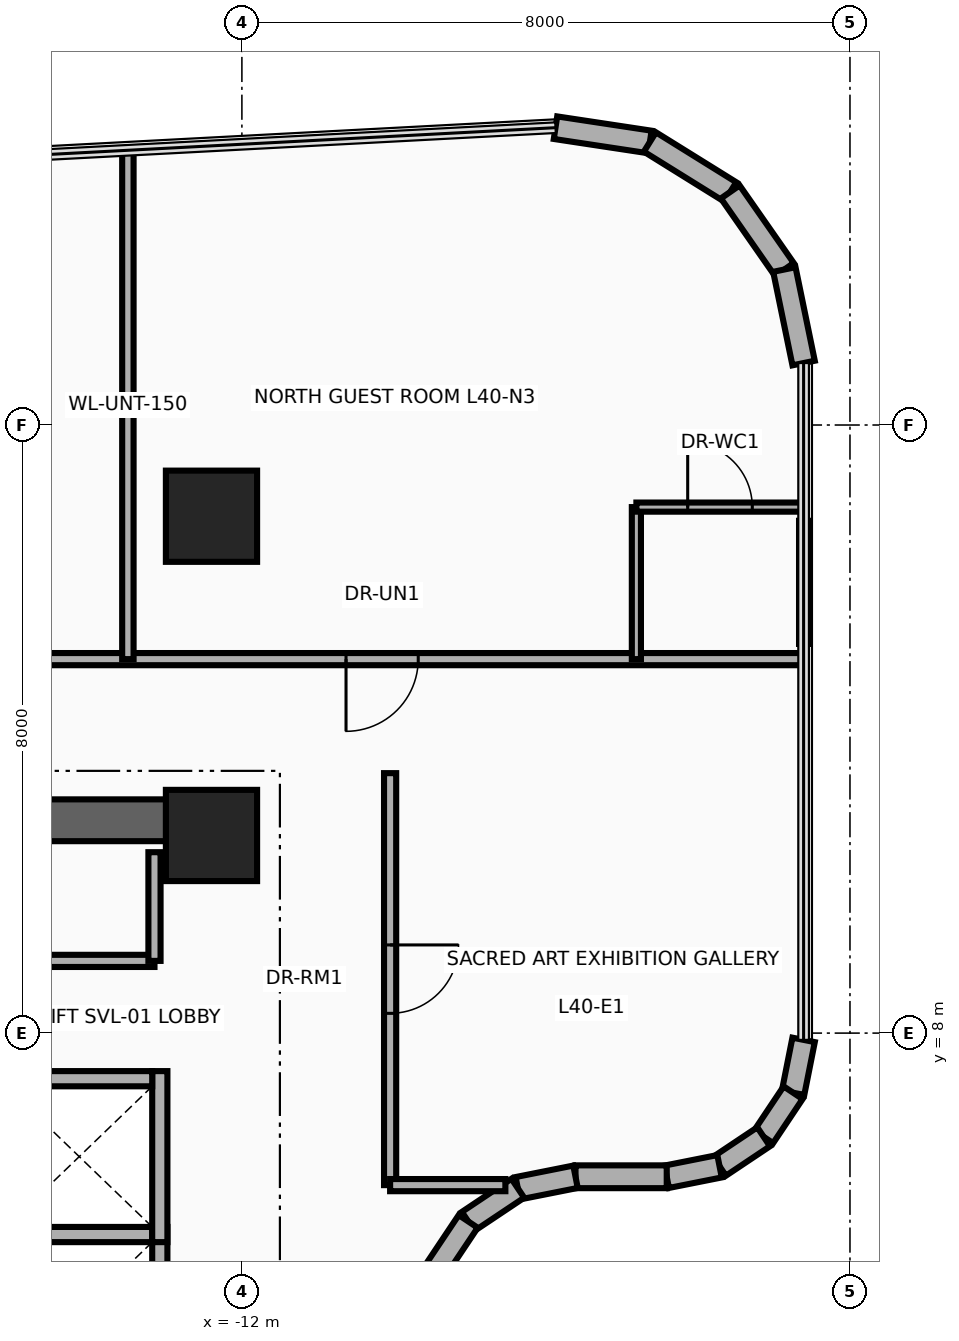
"""IFC4 building model, lengths in metres.
Left out: names, types, materials, properties, quantities, classifications, styles, units other than length and angle.
Written with IfcOpenShell. Run it as: python <this file> out.ifc"""

import sys

from ifc_helpers import new_model, si_unit, direction, frame, frame_2d, origin, origin_2d, place, context, subcontext, project, spatial, rectangle, extrude, source, transform, mapped, element, fill, save


model = new_model("IFC4")
c1 = context("Model", 3, precision=1e-05, world=origin(), true_north=direction((0.0, 1.0)))
c2 = subcontext(c1, "Body", "Model", "MODEL_VIEW")
j1 = project(units=[si_unit("LENGTHUNIT", "METRE"), si_unit("PLANEANGLEUNIT", "RADIAN")], contexts=[c1])
p1 = place(None, origin())
s1 = spatial("IfcSite", under=j1, at=p1, CompositionType="ELEMENT")
p2 = place(p1, origin())
s2 = spatial("IfcBuilding", under=s1, at=p2, CompositionType="ELEMENT")
p3 = place(p2, frame((0.0, 0.0, 157.5)))
s3 = spatial("IfcBuildingStorey", under=s2, at=p3, CompositionType="ELEMENT", Elevation=157.5)
p4 = place(p3, frame((-22.65, 10.8, 0.0), z_axis=(0.0, 0.0, 1.0), x_axis=(1.0, 0.0, 0.0)))
e1 = element("IfcWall", 1, at=p4, inside=s3, PredefinedType="SHEAR", context=c2, shape_type="SweptSolid", body=[
    extrude(rectangle(XDim=10.25, YDim=0.55, at=frame_2d((5.125, 0.0))), origin(), (0.0, 0.0, 1.0), 3.46),
])
m1 = source(origin(), c2, "Body", "SweptSolid", [
    extrude(rectangle(XDim=1.2, YDim=1.2, at=origin_2d()), origin(), (0.0, 0.0, 1.0), 3.7),
])
for number, where, z_axis, x_axis in (
    (2, (-12.4, 10.6, 0.0), (0.0, 0.0, 1.0), (1.0, 0.0, 0.0)),
    (3, (-12.4, 14.8, 0.0), (0.0, 0.0, 1.0), (1.0, 0.0, 0.0)),
):
    element("IfcColumn", number, at=place(p3, frame(where, z_axis=z_axis, x_axis=x_axis)), inside=s3, PredefinedType="COLUMN", context=c2, shape_type="MappedRepresentation", body=[
        mapped(m1, transform((0.0, 0.0, 0.0), x_axis=(1.0, 0.0, 0.0), y_axis=(0.0, 1.0, 0.0), z_axis=(0.0, 0.0, 1.0), scale=1.0)),
    ])
p5 = place(p3, frame((-7.874, 19.912, 0.0), z_axis=(0.0, 0.0, 1.0), x_axis=(0.988741655411, -0.149632679769, 0.0)))
e4 = element("IfcWall", 4, at=p5, inside=s3, PredefinedType="SOLIDWALL", context=c2, shape_type="SweptSolid", body=[
    extrude(rectangle(XDim=1.256, YDim=0.3, at=frame_2d((0.628, 0.0))), origin(), (0.0, 0.0, 1.0), 3.46),
])
p6 = place(p3, frame((-6.632, 19.724, 0.0), z_axis=(0.0, 0.0, 1.0), x_axis=(0.849285325289, -0.527934121126, 0.0)))
e5 = element("IfcWall", 5, at=p6, inside=s3, PredefinedType="SOLIDWALL", context=c2, shape_type="SweptSolid", body=[
    extrude(rectangle(XDim=1.244, YDim=0.3, at=frame_2d((0.622, 0.0))), origin(), (0.0, 0.0, 1.0), 3.46),
])
p7 = place(p3, frame((-5.575, 19.067, 0.0), z_axis=(0.0, 0.0, 1.0), x_axis=(0.571960670617, -0.820281044074, 0.0)))
e6 = element("IfcWall", 6, at=p7, inside=s3, PredefinedType="SOLIDWALL", context=c2, shape_type="SweptSolid", body=[
    extrude(rectangle(XDim=1.245, YDim=0.3, at=frame_2d((0.622, 0.0))), origin(), (0.0, 0.0, 1.0), 3.46),
])
p8 = place(p3, frame((-4.863, 18.046, 0.0), z_axis=(0.0, 0.0, 1.0), x_axis=(0.201532282172, -0.97948187285, 0.0)))
e7 = element("IfcWall", 7, at=p8, inside=s3, PredefinedType="SOLIDWALL", context=c2, shape_type="SweptSolid", body=[
    extrude(rectangle(XDim=1.256, YDim=0.3, at=frame_2d((0.628, 0.0))), origin(), (0.0, 0.0, 1.0), 3.46),
])
p9 = place(p3, frame((-4.61, 7.911, 0.0), z_axis=(0.0, 0.0, 1.0), x_axis=(-0.194989739953, -0.980805282058, 0.0)))
e8 = element("IfcWall", 8, at=p9, inside=s3, PredefinedType="SOLIDWALL", context=c2, shape_type="SweptSolid", body=[
    extrude(rectangle(XDim=0.709, YDim=0.3, at=frame_2d((0.354, 0.0))), origin(), (0.0, 0.0, 1.0), 3.46),
])
for number, where, z_axis, x_axis in (
    (9, (-4.748, 7.216, 0.0), (0.0, 0.0, 1.0), (-0.555, -0.832, 0.0)),
    (10, (-5.136, 6.636, 0.0), (0.0, 0.0, 1.0), (-0.832, -0.555, 0.0)),
):
    element("IfcWall", number, at=place(p3, frame(where, z_axis=z_axis, x_axis=x_axis)), inside=s3, PredefinedType="SOLIDWALL", context=c2, shape_type="SweptSolid", body=[
        extrude(rectangle(XDim=0.698, YDim=0.3, at=frame_2d((0.349, 0.0))), origin(), (0.0, 0.0, 1.0), 3.46),
    ])
p10 = place(p3, frame((-5.716, 6.248, 0.0), z_axis=(0.0, 0.0, 1.0), x_axis=(-0.980805282058, -0.194989739953, 0.0)))
e11 = element("IfcWall", 11, at=p10, inside=s3, PredefinedType="SOLIDWALL", context=c2, shape_type="SweptSolid", body=[
    extrude(rectangle(XDim=0.709, YDim=0.3, at=frame_2d((0.354, 0.0))), origin(), (0.0, 0.0, 1.0), 3.46),
])
p11 = place(p3, frame((-6.411, 6.11, 0.0), z_axis=(0.0, 0.0, 1.0), x_axis=(-1.0, 0.0, 0.0)))
e12 = element("IfcWall", 12, at=p11, inside=s3, PredefinedType="SOLIDWALL", context=c2, shape_type="SweptSolid", body=[
    extrude(rectangle(XDim=1.2, YDim=0.3, at=frame_2d((0.6, 0.0))), origin(), (0.0, 0.0, 1.0), 3.46),
])
p12 = place(p3, frame((-7.611, 6.11, 0.0), z_axis=(0.0, 0.0, 1.0), x_axis=(-0.98076219082, -0.195206365311, 0.0)))
e13 = element("IfcWall", 13, at=p12, inside=s3, PredefinedType="SOLIDWALL", context=c2, shape_type="SweptSolid", body=[
    extrude(rectangle(XDim=0.774, YDim=0.3, at=frame_2d((0.387, 0.0))), origin(), (0.0, 0.0, 1.0), 3.46),
])
for number, where, z_axis, x_axis in (
    (14, (-8.37, 5.959, 0.0), (0.0, 0.0, 1.0), (-0.831, -0.556, 0.0)),
    (15, (-9.023, 5.523, 0.0), (0.0, 0.0, 1.0), (-0.556, -0.831, 0.0)),
):
    element("IfcWall", number, at=place(p3, frame(where, z_axis=z_axis, x_axis=x_axis)), inside=s3, PredefinedType="SOLIDWALL", context=c2, shape_type="SweptSolid", body=[
        extrude(rectangle(XDim=0.785, YDim=0.3, at=frame_2d((0.393, 0.0))), origin(), (0.0, 0.0, 1.0), 3.46),
    ])
p13 = place(p3, frame((-13.08, 3.2, 0.0), z_axis=(0.0, 0.0, 1.0), x_axis=(0.0, 1.0, 0.0)))
e16 = element("IfcWall", 16, at=p13, inside=s3, PredefinedType="MOVABLE", context=c2, shape_type="SweptSolid", body=[
    extrude(rectangle(XDim=2.25, YDim=0.2, at=frame_2d((1.125, 0.0))), origin(), (0.0, 0.0, 1.0), 3.46),
])
p14 = place(p3, frame((-15.1, 5.35, 0.0), z_axis=(0.0, 0.0, 1.0), x_axis=(1.0, 0.0, 0.0)))
e17 = element("IfcWall", 17, at=p14, inside=s3, PredefinedType="MOVABLE", context=c2, shape_type="SweptSolid", body=[
    extrude(rectangle(XDim=1.92, YDim=0.2, at=frame_2d((0.96, 0.0))), origin(), (0.0, 0.0, 1.0), 3.46),
])
p15 = place(p3, frame((-13.08, 5.25, 0.0), z_axis=(0.0, 0.0, 1.0), x_axis=(0.0, 1.0, 0.0)))
e18 = element("IfcWall", 18, at=p15, inside=s3, PredefinedType="MOVABLE", context=c2, shape_type="SweptSolid", body=[
    extrude(rectangle(XDim=2.25, YDim=0.2, at=frame_2d((1.125, 0.0))), origin(), (0.0, 0.0, 1.0), 3.46),
])
p16 = place(p3, frame((-15.1, 7.4, 0.0), z_axis=(0.0, 0.0, 1.0), x_axis=(1.0, 0.0, 0.0)))
e19 = element("IfcWall", 19, at=p16, inside=s3, PredefinedType="MOVABLE", context=c2, shape_type="SweptSolid", body=[
    extrude(rectangle(XDim=1.92, YDim=0.2, at=frame_2d((0.96, 0.0))), origin(), (0.0, 0.0, 1.0), 3.46),
])
p17 = place(p3, frame((-18.65, 8.95, 0.0), z_axis=(0.0, 0.0, 1.0), x_axis=(1.0, 0.0, 0.0)))
e20 = element("IfcWall", 20, at=p17, inside=s3, PredefinedType="PARTITIONING", context=c2, shape_type="SweptSolid", body=[
    extrude(rectangle(XDim=5.5, YDim=0.16, at=frame_2d((2.75, 0.0))), origin(), (0.0, 0.0, 1.0), 3.46),
])
p18 = place(p17, frame((0.3, 0.0, 0.0)))
e21 = element("IfcOpeningElement", 21, at=p18, cuts=e20, PredefinedType="OPENING", context=c2, shape_type="SweptSolid", body=[
    extrude(rectangle(XDim=0.85, YDim=2.05, at=frame_2d((0.425, 1.025))), frame((0.0, 0.095, 0.0), z_axis=(0.0, -1.0, 0.0), x_axis=(1.0, 0.0, 0.0)), (0.0, 0.0, 1.0), 0.19),
])
p19 = place(p17, frame((2.5, 0.0, 0.0)))
e22 = element("IfcOpeningElement", 22, at=p19, cuts=e20, PredefinedType="OPENING", context=c2, shape_type="SweptSolid", body=[
    extrude(rectangle(XDim=0.95, YDim=2.15, at=frame_2d((0.475, 1.075))), frame((0.0, 0.095, 0.0), z_axis=(0.0, -1.0, 0.0), x_axis=(1.0, 0.0, 0.0)), (0.0, 0.0, 1.0), 0.19),
])
p20 = place(p3, frame((-13.15, 8.95, 0.0), z_axis=(0.0, 0.0, 1.0), x_axis=(0.0, 1.0, 0.0)))
e23 = element("IfcWall", 23, at=p20, inside=s3, PredefinedType="PARTITIONING", context=c2, shape_type="SweptSolid", body=[
    extrude(rectangle(XDim=1.43, YDim=0.16, at=frame_2d((0.715, 0.0))), origin(), (0.0, 0.0, 1.0), 3.46),
])
p21 = place(p3, frame((-28.25, 12.92, 0.0), z_axis=(0.0, 0.0, 1.0), x_axis=(1.0, 0.0, 0.0)))
e24 = element("IfcWall", 24, at=p21, inside=s3, PredefinedType="PARTITIONING", context=c2, shape_type="SweptSolid", body=[
    extrude(rectangle(XDim=23.64, YDim=0.16, at=frame_2d((11.82, 0.0))), origin(), (0.0, 0.0, 1.0), 2.834),
])
p22 = place(p21, frame((2.75, 0.0, 0.0)))
e25 = element("IfcOpeningElement", 25, at=p22, cuts=e24, PredefinedType="OPENING", context=c2, shape_type="SweptSolid", body=[
    extrude(rectangle(XDim=0.95, YDim=2.15, at=frame_2d((0.475, 1.075))), frame((0.0, 0.095, 0.0), z_axis=(0.0, -1.0, 0.0), x_axis=(1.0, 0.0, 0.0)), (0.0, 0.0, 1.0), 0.19),
])
p23 = place(p21, frame((10.125, 0.0, 0.0)))
e26 = element("IfcOpeningElement", 26, at=p23, cuts=e24, PredefinedType="OPENING", context=c2, shape_type="SweptSolid", body=[
    extrude(rectangle(XDim=0.95, YDim=2.15, at=frame_2d((0.475, 1.075))), frame((0.0, 0.095, 0.0), z_axis=(0.0, -1.0, 0.0), x_axis=(1.0, 0.0, 0.0)), (0.0, 0.0, 1.0), 0.19),
])
p24 = place(p21, frame((17.62, 0.0, 0.0)))
e27 = element("IfcOpeningElement", 27, at=p24, cuts=e24, PredefinedType="OPENING", context=c2, shape_type="SweptSolid", body=[
    extrude(rectangle(XDim=0.95, YDim=2.15, at=frame_2d((0.475, 1.075))), frame((0.0, 0.095, 0.0), z_axis=(0.0, -1.0, 0.0), x_axis=(1.0, 0.0, 0.0)), (0.0, 0.0, 1.0), 0.19),
])
p25 = place(p3, frame((-13.5, 12.92, 0.0), z_axis=(0.0, 0.0, 1.0), x_axis=(0.0, 1.0, 0.0)))
e28 = element("IfcWall", 28, at=p25, inside=s3, PredefinedType="PARTITIONING", context=c2, shape_type="SweptSolid", body=[
    extrude(rectangle(XDim=6.694, YDim=0.15, at=frame_2d((3.347, 0.0))), origin(), (0.0, 0.0, 1.0), 2.666),
])
p26 = place(p3, frame((-6.81, 12.92, 0.0), z_axis=(0.0, 0.0, 1.0), x_axis=(0.0, 1.0, 0.0)))
e29 = element("IfcWall", 29, at=p26, inside=s3, PredefinedType="PARTITIONING", context=c2, shape_type="SweptSolid", body=[
    extrude(rectangle(XDim=2.0, YDim=0.12, at=frame_2d((1.0, 0.0))), origin(), (0.0, 0.0, 1.0), 3.46),
])
p27 = place(p3, frame((-6.81, 14.92, 0.0), z_axis=(0.0, 0.0, 1.0), x_axis=(1.0, 0.0, 0.0)))
e30 = element("IfcWall", 30, at=p27, inside=s3, PredefinedType="PARTITIONING", context=c2, shape_type="SweptSolid", body=[
    extrude(rectangle(XDim=2.2, YDim=0.12, at=frame_2d((1.1, 0.0))), origin(), (0.0, 0.0, 1.0), 3.46),
])
p28 = place(p27, frame((0.675, 0.0, 0.0)))
e31 = element("IfcOpeningElement", 31, at=p28, cuts=e30, PredefinedType="OPENING", context=c2, shape_type="SweptSolid", body=[
    extrude(rectangle(XDim=0.85, YDim=2.1, at=frame_2d((0.425, 1.05))), frame((0.0, 0.075, 0.0), z_axis=(0.0, -1.0, 0.0), x_axis=(1.0, 0.0, 0.0)), (0.0, 0.0, 1.0), 0.15),
])
p29 = place(p3, frame((-4.61, 13.12, 0.0), z_axis=(0.0, 0.0, 1.0), x_axis=(0.0, 1.0, 0.0)))
e32 = element("IfcWall", 32, at=p29, inside=s3, PredefinedType="PARTITIONING", context=c2, shape_type="SweptSolid", body=[
    extrude(rectangle(XDim=1.62, YDim=0.12, at=frame_2d((0.81, 0.0))), origin(), (0.0, 0.0, 1.0), 3.46),
])
p30 = place(p3, frame((-10.05, 6.0, 0.0), z_axis=(0.0, 0.0, 1.0), x_axis=(0.0, 1.0, 0.0)))
e33 = element("IfcWall", 33, at=p30, inside=s3, PredefinedType="PARTITIONING", context=c2, shape_type="SweptSolid", body=[
    extrude(rectangle(XDim=5.42, YDim=0.16, at=frame_2d((2.71, 0.0))), origin(), (0.0, 0.0, 1.0), 3.46),
])
p31 = place(p30, frame((2.26, 0.0, 0.0)))
e34 = element("IfcOpeningElement", 34, at=p31, cuts=e33, PredefinedType="OPENING", context=c2, shape_type="SweptSolid", body=[
    extrude(rectangle(XDim=0.9, YDim=2.1, at=frame_2d((0.45, 1.05))), frame((0.0, 0.095, 0.0), z_axis=(0.0, -1.0, 0.0), x_axis=(1.0, 0.0, 0.0)), (0.0, 0.0, 1.0), 0.19),
])
p32 = place(p3, frame((-10.05, 6.0, 0.0), z_axis=(0.0, 0.0, 1.0), x_axis=(1.0, 0.0, 0.0)))
e35 = element("IfcWall", 35, at=p32, inside=s3, PredefinedType="PARTITIONING", context=c2, shape_type="SweptSolid", body=[
    extrude(rectangle(XDim=1.516, YDim=0.16, at=frame_2d((0.758, 0.0))), origin(), (0.0, 0.0, 1.0), 3.46),
])
p33 = place(p24, frame((0.95, 0.0, 0.0), z_axis=(0.0, 0.0, 1.0), x_axis=(-1.0, 0.0, 0.0)))
e36 = element("IfcDoor", 36, at=p33, inside=s3, OperationType="SINGLE_SWING_LEFT", PredefinedType="DOOR", context=c2, shape_type="SweptSolid", body=[
    extrude(rectangle(XDim=0.95, YDim=2.15, at=frame_2d((0.475, 1.075))), frame((0.0, 0.025, 0.0), z_axis=(0.0, -1.0, 0.0), x_axis=(1.0, 0.0, 0.0)), (0.0, 0.0, 1.0), 0.05),
])
fill(e27, e36)
p34 = place(p28, origin())
e37 = element("IfcDoor", 37, at=p34, inside=s3, OperationType="SINGLE_SWING_RIGHT", PredefinedType="DOOR", context=c2, shape_type="SweptSolid", body=[
    extrude(rectangle(XDim=0.85, YDim=2.1, at=frame_2d((0.425, 1.05))), frame((0.0, 0.025, 0.0), z_axis=(0.0, -1.0, 0.0), x_axis=(1.0, 0.0, 0.0)), (0.0, 0.0, 1.0), 0.05),
])
fill(e31, e37)
p35 = place(p31, frame((0.9, 0.0, 0.0), z_axis=(0.0, 0.0, 1.0), x_axis=(-1.0, 0.0, 0.0)))
e38 = element("IfcDoor", 38, at=p35, inside=s3, OperationType="SINGLE_SWING_LEFT", PredefinedType="DOOR", context=c2, shape_type="SweptSolid", body=[
    extrude(rectangle(XDim=0.9, YDim=2.1, at=frame_2d((0.45, 1.05))), frame((0.0, 0.025, 0.0), z_axis=(0.0, -1.0, 0.0), x_axis=(1.0, 0.0, 0.0)), (0.0, 0.0, 1.0), 0.05),
])
fill(e34, e38)
save(model, sys.argv[1])
